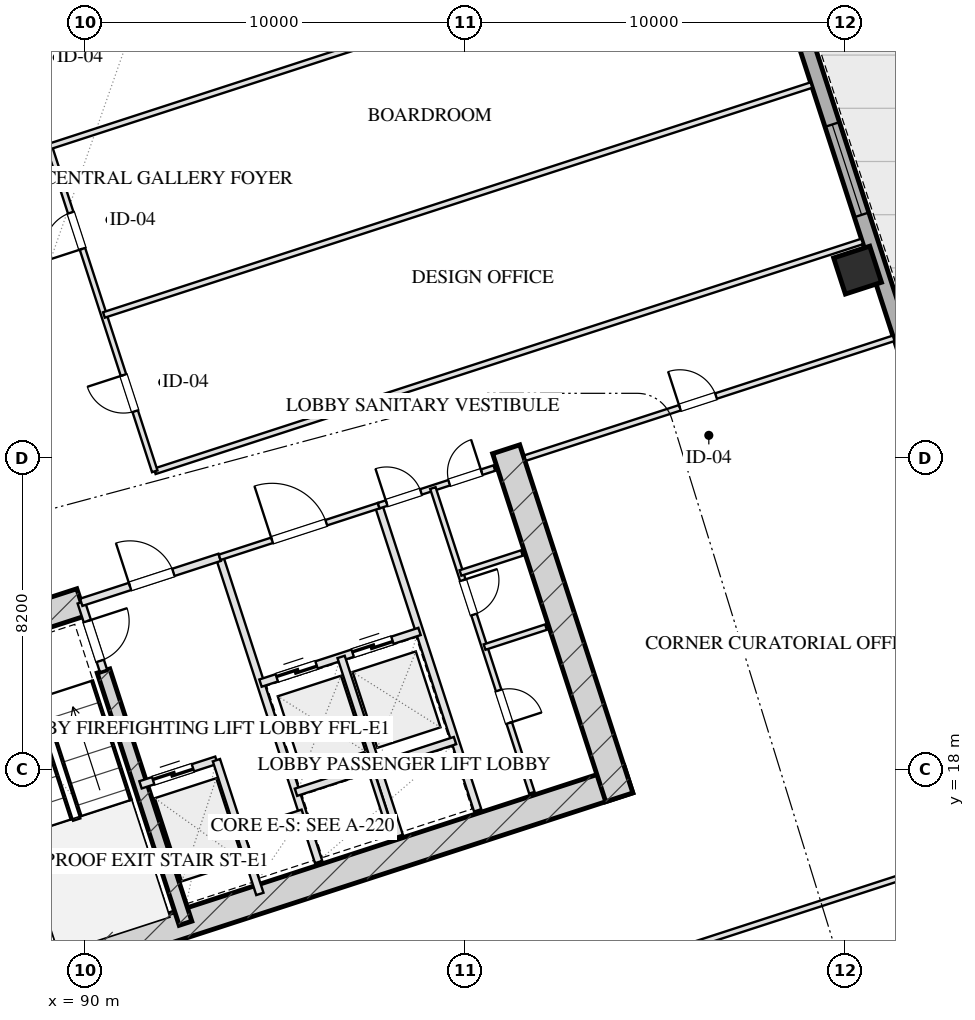
"""IFC4 building model, lengths in metres.
Left out: names, types, materials, properties, quantities, classifications, styles, units other than length and angle.
Written with IfcOpenShell. Run it as: python <this file> out.ifc"""

import sys

from ifc_helpers import new_model, si_unit, direction, frame, frame_2d, origin, origin_2d, place, context, subcontext, project, spatial, rectangle, hollow_rectangle, extrude, element, fill, save


model = new_model("IFC4")
c1 = context("Model", 3, precision=1e-05, world=origin(), true_north=direction((0.0, 1.0)))
c2 = subcontext(c1, "Body", "Model", "MODEL_VIEW")
j1 = project(units=[si_unit("LENGTHUNIT", "METRE"), si_unit("PLANEANGLEUNIT", "RADIAN")], contexts=[c1])
p1 = place(None, origin())
s1 = spatial("IfcSite", under=j1, at=p1, CompositionType="ELEMENT")
p2 = place(p1, origin())
s2 = spatial("IfcBuilding", under=s1, at=p2, CompositionType="ELEMENT")
p3 = place(p2, frame((0.0, 0.0, 26.0)))
s3 = spatial("IfcBuildingStorey", under=s2, at=p3, CompositionType="ELEMENT", Elevation=26.0)
p4 = place(p3, frame((88.559, 12.629, 0.0), z_axis=(0.0, 0.0, 1.0), x_axis=(0.951056072937, 0.309018358888, 0.0)))
e1 = element("IfcWall", 1, at=p4, inside=s3, PredefinedType="SHEAR", context=c2, shape_type="SweptSolid", body=[
    extrude(rectangle(XDim=16.55, YDim=0.75, at=frame_2d((8.275, 0.0))), origin(), (0.0, 0.0, 1.0), 4.0),
])
p5 = place(p3, frame((86.055, 21.546, 0.0), z_axis=(0.0, 0.0, 1.0), x_axis=(0.309023585745, -0.951054374604, 0.0)))
e2 = element("IfcWall", 2, at=p5, inside=s3, PredefinedType="SHEAR", context=c2, shape_type="SweptSolid", body=[
    extrude(rectangle(XDim=9.63, YDim=0.75, at=frame_2d((4.815, 0.0))), origin(), (0.0, 0.0, 1.0), 4.0),
])
p6 = place(p3, frame((101.082, 26.429, 0.0), z_axis=(0.0, 0.0, 1.0), x_axis=(0.309016134813, -0.951056795583, 0.0)))
e3 = element("IfcWall", 3, at=p6, inside=s3, PredefinedType="SHEAR", context=c2, shape_type="SweptSolid", body=[
    extrude(rectangle(XDim=9.63, YDim=0.75, at=frame_2d((4.815, 0.0))), origin(), (0.0, 0.0, 1.0), 4.0),
])
p7 = place(p3, frame((90.486, 20.594, 0.0), z_axis=(0.0, 0.0, 1.0), x_axis=(0.309020428229, -0.951055400562, 0.0)))
e4 = element("IfcWall", 4, at=p7, inside=s3, PredefinedType="SHEAR", context=c2, shape_type="SweptSolid", body=[
    extrude(rectangle(XDim=6.98, YDim=0.35, at=frame_2d((3.49, 0.0))), origin(), (0.0, 0.0, 1.0), 4.0),
])
p8 = place(p3, frame((85.814, 21.074, 0.0), z_axis=(0.0, 0.0, 1.0), x_axis=(0.95106580992, 0.308988390074, 0.0)))
e5 = element("IfcWall", 5, at=p8, inside=s3, PredefinedType="SHEAR", context=c2, shape_type="SweptSolid", body=[
    extrude(rectangle(XDim=4.295, YDim=0.75, at=frame_2d((2.147, 0.0))), origin(), (0.0, 0.0, 1.0), 4.0),
])
p9 = place(p3, frame((110.328, 31.142, 0.0), z_axis=(0.0, 0.0, 1.0), x_axis=(0.951056516295, 0.309016994375, 0.0)))
e6 = element("IfcColumn", 6, at=p9, inside=s3, PredefinedType="COLUMN", context=c2, shape_type="SweptSolid", body=[
    extrude(hollow_rectangle(XDim=1.0, YDim=1.0, WallThickness=0.036, at=origin_2d()), origin(), (0.0, 0.0, 1.0), 4.001),
])
p10 = place(p3, frame((100.345, 63.648, 0.0), z_axis=(0.0, 0.0, 1.0), x_axis=(0.309014526607, -0.951057318118, 0.0)))
e7 = element("IfcWall", 7, at=p10, inside=s3, PredefinedType="SOLIDWALL", context=c2, shape_type="SweptSolid", body=[
    extrude(rectangle(XDim=50.0, YDim=0.4, at=frame_2d((25.0, 0.0))), origin(), (0.0, 0.0, 1.0), 3.16),
])
p11 = place(p10, frame((30.15, 0.0, 0.75)))
e8 = element("IfcOpeningElement", 8, at=p11, cuts=e7, PredefinedType="OPENING", context=c2, shape_type="SweptSolid", body=[
    extrude(rectangle(XDim=2.5, YDim=1.75, at=frame_2d((1.25, 0.875))), frame((0.0, 0.21, 0.0), z_axis=(0.0, -1.0, 0.0), x_axis=(1.0, 0.0, 0.0)), (0.0, 0.0, 1.0), 0.42),
])
p12 = place(p10, frame((21.15, 0.0, 0.75)))
e9 = element("IfcOpeningElement", 9, at=p12, cuts=e7, PredefinedType="OPENING", context=c2, shape_type="SweptSolid", body=[
    extrude(rectangle(XDim=2.5, YDim=1.75, at=frame_2d((1.25, 0.875))), frame((0.0, 0.21, 0.0), z_axis=(0.0, -1.0, 0.0), x_axis=(1.0, 0.0, 0.0)), (0.0, 0.0, 1.0), 0.42),
])
p13 = place(p3, frame((89.899, 22.401, 0.0), z_axis=(0.0, 0.0, 1.0), x_axis=(0.308932062672, -0.951084108086, 0.0)))
e10 = element("IfcWall", 10, at=p13, inside=s3, PredefinedType="PARTITIONING", context=c2, shape_type="SweptSolid", body=[
    extrude(rectangle(XDim=1.9, YDim=0.2, at=frame_2d((0.95, 0.0))), origin(), (0.0, 0.0, 1.0), 3.725),
])
p14 = place(p13, frame((0.52, 0.0, 0.0)))
e11 = element("IfcOpeningElement", 11, at=p14, cuts=e10, PredefinedType="OPENING", context=c2, shape_type="SweptSolid", body=[
    extrude(rectangle(XDim=1.1, YDim=2.05, at=frame_2d((0.55, 1.025))), frame((0.0, 0.11, 0.0), z_axis=(0.0, -1.0, 0.0), x_axis=(1.0, 0.0, 0.0)), (0.0, 0.0, 1.0), 0.22),
])
p15 = place(p3, frame((93.542, 23.585, 0.0), z_axis=(0.0, 0.0, 1.0), x_axis=(0.309042196757, -0.951048327176, 0.0)))
e12 = element("IfcWall", 12, at=p15, inside=s3, PredefinedType="PARTITIONING", context=c2, shape_type="SweptSolid", body=[
    extrude(rectangle(XDim=8.43, YDim=0.2, at=frame_2d((4.215, 0.0))), origin(), (0.0, 0.0, 1.0), 3.725),
])
p16 = place(p3, frame((89.899, 22.401, 0.0), z_axis=(0.0, 0.0, 1.0), x_axis=(0.951046716504, 0.309047153403, 0.0)))
e13 = element("IfcWall", 13, at=p16, inside=s3, PredefinedType="PARTITIONING", context=c2, shape_type="SweptSolid", body=[
    extrude(rectangle(XDim=3.83, YDim=0.2, at=frame_2d((1.915, 0.0))), origin(), (0.0, 0.0, 1.0), 3.725),
])
p17 = place(p16, frame((1.35, 0.0, 0.0)))
e14 = element("IfcOpeningElement", 14, at=p17, cuts=e13, PredefinedType="OPENING", context=c2, shape_type="SweptSolid", body=[
    extrude(rectangle(XDim=1.2, YDim=2.05, at=frame_2d((0.6, 1.025))), frame((0.0, 0.11, 0.0), z_axis=(0.0, -1.0, 0.0), x_axis=(1.0, 0.0, 0.0)), (0.0, 0.0, 1.0), 0.22),
])
p18 = place(p3, frame((91.46, 17.598, 0.0), z_axis=(0.0, 0.0, 1.0), x_axis=(0.951062257173, 0.308999325213, 0.0)))
e15 = element("IfcWall", 15, at=p18, inside=s3, PredefinedType="PARTITIONING", context=c2, shape_type="SweptSolid", body=[
    extrude(rectangle(XDim=2.1, YDim=0.2, at=frame_2d((1.05, 0.0))), origin(), (0.0, 0.0, 1.0), 3.725),
])
p19 = place(p18, frame((0.35, 0.0, 0.0)))
e16 = element("IfcOpeningElement", 16, at=p19, cuts=e15, PredefinedType="OPENING", context=c2, shape_type="SweptSolid", body=[
    extrude(rectangle(XDim=1.1, YDim=2.05, at=frame_2d((0.55, 1.025))), frame((0.0, 0.11, 0.0), z_axis=(0.0, -1.0, 0.0), x_axis=(1.0, 0.0, 0.0)), (0.0, 0.0, 1.0), 0.22),
])
p20 = place(p3, frame((93.457, 18.247, 0.0), z_axis=(0.0, 0.0, 1.0), x_axis=(0.3089935693, -0.951064127245, 0.0)))
e17 = element("IfcWall", 17, at=p20, inside=s3, PredefinedType="PARTITIONING", context=c2, shape_type="SweptSolid", body=[
    extrude(rectangle(XDim=3.7, YDim=0.2, at=frame_2d((1.85, 0.0))), origin(), (0.0, 0.0, 1.0), 3.725),
])
p21 = place(p3, frame((94.084, 16.317, 0.0), z_axis=(0.0, 0.0, 1.0), x_axis=(0.951041328149, 0.309063734775, 0.0)))
e18 = element("IfcWall", 18, at=p21, inside=s3, PredefinedType="PARTITIONING", context=c2, shape_type="SweptSolid", body=[
    extrude(rectangle(XDim=1.73, YDim=0.2, at=frame_2d((0.865, 0.0))), origin(), (0.0, 0.0, 1.0), 3.725),
])
p22 = place(p3, frame((97.727, 24.944, 0.0), z_axis=(0.0, 0.0, 1.0), x_axis=(0.309016001439, -0.951056838919, 0.0)))
e19 = element("IfcWall", 19, at=p22, inside=s3, PredefinedType="PARTITIONING", context=c2, shape_type="SweptSolid", body=[
    extrude(rectangle(XDim=8.43, YDim=0.2, at=frame_2d((4.215, 0.0))), origin(), (0.0, 0.0, 1.0), 3.725),
])
p23 = place(p3, frame((93.542, 23.585, 0.0), z_axis=(0.0, 0.0, 1.0), x_axis=(0.951063829732, 0.308994485023, 0.0)))
e20 = element("IfcWall", 20, at=p23, inside=s3, PredefinedType="PARTITIONING", context=c2, shape_type="SweptSolid", body=[
    extrude(rectangle(XDim=4.4, YDim=0.15, at=frame_2d((2.2, 0.0))), origin(), (0.0, 0.0, 1.0), 3.725),
])
p24 = place(p23, frame((1.45, 0.0, 0.0)))
e21 = element("IfcOpeningElement", 21, at=p24, cuts=e20, PredefinedType="OPENING", context=c2, shape_type="SweptSolid", body=[
    extrude(rectangle(XDim=1.5, YDim=2.05, at=frame_2d((0.75, 1.025))), frame((0.0, 0.085, 0.0), z_axis=(0.0, -1.0, 0.0), x_axis=(1.0, 0.0, 0.0)), (0.0, 0.0, 1.0), 0.17),
])
p25 = place(p3, frame((94.617, 20.275, 0.0), z_axis=(0.0, 0.0, 1.0), x_axis=(0.951058531764, 0.30901079133, 0.0)))
e22 = element("IfcWall", 22, at=p25, inside=s3, PredefinedType="PARTITIONING", context=c2, shape_type="SweptSolid", body=[
    extrude(rectangle(XDim=4.4, YDim=0.2, at=frame_2d((2.2, 0.0))), origin(), (0.0, 0.0, 1.0), 3.725),
])
p26 = place(p25, frame((0.45, 0.0, 0.0)))
e23 = element("IfcOpeningElement", 23, at=p26, cuts=e22, PredefinedType="OPENING", context=c2, shape_type="SweptSolid", body=[
    extrude(rectangle(XDim=1.1, YDim=2.05, at=frame_2d((0.55, 1.025))), frame((0.0, 0.11, 0.0), z_axis=(0.0, -1.0, 0.0), x_axis=(1.0, 0.0, 0.0)), (0.0, 0.0, 1.0), 0.22),
])
p27 = place(p25, frame((2.55, 0.0, 0.0)))
e24 = element("IfcOpeningElement", 24, at=p27, cuts=e22, PredefinedType="OPENING", context=c2, shape_type="SweptSolid", body=[
    extrude(rectangle(XDim=1.1, YDim=2.05, at=frame_2d((0.55, 1.025))), frame((0.0, 0.11, 0.0), z_axis=(0.0, -1.0, 0.0), x_axis=(1.0, 0.0, 0.0)), (0.0, 0.0, 1.0), 0.22),
])
p28 = place(p3, frame((96.738, 20.964, 0.0), z_axis=(0.0, 0.0, 1.0), x_axis=(0.309042578481, -0.951048203135, 0.0)))
e25 = element("IfcWall", 25, at=p28, inside=s3, PredefinedType="PARTITIONING", context=c2, shape_type="SweptSolid", body=[
    extrude(rectangle(XDim=4.95, YDim=0.2, at=frame_2d((2.475, 0.0))), origin(), (0.0, 0.0, 1.0), 3.725),
])
p29 = place(p3, frame((95.551, 17.403, 0.0), z_axis=(0.0, 0.0, 1.0), x_axis=(0.951058531764, 0.30901079133, 0.0)))
e26 = element("IfcWall", 26, at=p29, inside=s3, PredefinedType="PARTITIONING", context=c2, shape_type="SweptSolid", body=[
    extrude(rectangle(XDim=4.4, YDim=0.2, at=frame_2d((2.2, 0.0))), origin(), (0.0, 0.0, 1.0), 3.725),
])
p30 = place(p3, frame((97.516, 17.989, 0.0), z_axis=(0.0, 0.0, 1.0), x_axis=(0.30897153969, -0.951071284217, 0.0)))
e27 = element("IfcWall", 27, at=p30, inside=s3, PredefinedType="PARTITIONING", context=c2, shape_type="SweptSolid", body=[
    extrude(rectangle(XDim=1.88, YDim=0.15, at=frame_2d((0.94, 0.0))), origin(), (0.0, 0.0, 1.0), 3.725),
])
p31 = place(p3, frame((97.727, 24.944, 0.0), z_axis=(0.0, 0.0, 1.0), x_axis=(0.951036872128, 0.309077446369, 0.0)))
e28 = element("IfcWall", 28, at=p31, inside=s3, PredefinedType="PARTITIONING", context=c2, shape_type="SweptSolid", body=[
    extrude(rectangle(XDim=3.2, YDim=0.15, at=frame_2d((1.6, 0.0))), origin(), (0.0, 0.0, 1.0), 3.725),
])
p32 = place(p31, frame((0.22, 0.0, 0.0)))
e29 = element("IfcOpeningElement", 29, at=p32, cuts=e28, PredefinedType="OPENING", context=c2, shape_type="SweptSolid", body=[
    extrude(rectangle(XDim=0.95, YDim=2.05, at=frame_2d((0.475, 1.025))), frame((0.0, 0.085, 0.0), z_axis=(0.0, -1.0, 0.0), x_axis=(1.0, 0.0, 0.0)), (0.0, 0.0, 1.0), 0.17),
])
p33 = place(p31, frame((1.95, 0.0, 0.0)))
e30 = element("IfcOpeningElement", 30, at=p33, cuts=e28, PredefinedType="OPENING", context=c2, shape_type="SweptSolid", body=[
    extrude(rectangle(XDim=0.9, YDim=2.05, at=frame_2d((0.45, 1.025))), frame((0.0, 0.085, 0.0), z_axis=(0.0, -1.0, 0.0), x_axis=(1.0, 0.0, 0.0)), (0.0, 0.0, 1.0), 0.17),
])
p34 = place(p3, frame((99.153, 25.408, 0.0), z_axis=(0.0, 0.0, 1.0), x_axis=(0.309016001439, -0.951056838919, 0.0)))
e31 = element("IfcWall", 31, at=p34, inside=s3, PredefinedType="PARTITIONING", context=c2, shape_type="SweptSolid", body=[
    extrude(rectangle(XDim=8.43, YDim=0.15, at=frame_2d((4.215, 0.0))), origin(), (0.0, 0.0, 1.0), 3.725),
])
p35 = place(p34, frame((2.55, 0.0, 0.0)))
e32 = element("IfcOpeningElement", 32, at=p35, cuts=e31, PredefinedType="OPENING", context=c2, shape_type="SweptSolid", body=[
    extrude(rectangle(XDim=0.95, YDim=2.05, at=frame_2d((0.475, 1.025))), frame((0.0, 0.085, 0.0), z_axis=(0.0, -1.0, 0.0), x_axis=(1.0, 0.0, 0.0)), (0.0, 0.0, 1.0), 0.17),
])
p36 = place(p34, frame((5.6, 0.0, 0.0)))
e33 = element("IfcOpeningElement", 33, at=p36, cuts=e31, PredefinedType="OPENING", context=c2, shape_type="SweptSolid", body=[
    extrude(rectangle(XDim=0.9, YDim=2.05, at=frame_2d((0.45, 1.025))), frame((0.0, 0.085, 0.0), z_axis=(0.0, -1.0, 0.0), x_axis=(1.0, 0.0, 0.0)), (0.0, 0.0, 1.0), 0.17),
])
for number, where, z_axis, x_axis in (
    (34, (100.513, 21.223, 0.0), (0.0, 0.0, 1.0), (0.951, 0.309, 0.0)),
    (35, (99.879, 23.173, 0.0), (0.0, 0.0, 1.0), (0.951, 0.309, 0.0)),
):
    element("IfcWall", number, at=place(p3, frame(where, z_axis=z_axis, x_axis=x_axis)), inside=s3, PredefinedType="PARTITIONING", context=c2, shape_type="SweptSolid", body=[
        extrude(rectangle(XDim=1.7, YDim=0.15, at=frame_2d((0.85, 0.0))), origin(), (0.0, 0.0, 1.0), 3.725),
    ])
p37 = place(p3, frame((105.765, 13.309, 0.0), z_axis=(0.0, 0.0, 1.0), x_axis=(0.951054294345, 0.309023832749, 0.0)))
e36 = element("IfcWall", 36, at=p37, inside=s3, PredefinedType="PARTITIONING", context=c2, shape_type="SweptSolid", body=[
    extrude(rectangle(XDim=10.2, YDim=0.15, at=frame_2d((5.1, 0.0))), origin(), (0.0, 0.0, 1.0), 3.725),
])
p38 = place(p3, frame((101.578, 26.196, 0.0), z_axis=(0.0, 0.0, 1.0), x_axis=(0.951059043131, 0.309009217467, 0.0)))
e37 = element("IfcWall", 37, at=p38, inside=s3, PredefinedType="PARTITIONING", context=c2, shape_type="SweptSolid", body=[
    extrude(rectangle(XDim=10.2, YDim=0.15, at=frame_2d((5.1, 0.0))), origin(), (0.0, 0.0, 1.0), 3.725),
])
p39 = place(p38, frame((4.284, 0.0, 0.0)))
e38 = element("IfcOpeningElement", 38, at=p39, cuts=e37, PredefinedType="OPENING", context=c2, shape_type="SweptSolid", body=[
    extrude(rectangle(XDim=1.0, YDim=2.05, at=frame_2d((0.5, 1.025))), frame((0.0, 0.085, 0.0), z_axis=(0.0, -1.0, 0.0), x_axis=(1.0, 0.0, 0.0)), (0.0, 0.0, 1.0), 0.17),
])
p40 = place(p3, frame((91.834, 25.848, 0.0), z_axis=(0.0, 0.0, 1.0), x_axis=(0.951055605195, 0.309019798438, 0.0)))
e39 = element("IfcWall", 39, at=p40, inside=s3, PredefinedType="PARTITIONING", context=c2, shape_type="SweptSolid", body=[
    extrude(rectangle(XDim=19.575, YDim=0.15, at=frame_2d((9.788, 0.0))), origin(), (0.0, 0.0, 1.0), 3.725),
])
p41 = place(p3, frame((91.834, 25.848, 0.0), z_axis=(0.0, 0.0, 1.0), x_axis=(-0.30901773025, 0.951056277195, 0.0)))
e40 = element("IfcWall", 40, at=p41, inside=s3, PredefinedType="PARTITIONING", context=c2, shape_type="SweptSolid", body=[
    extrude(rectangle(XDim=16.64, YDim=0.15, at=frame_2d((8.32, 0.0))), origin(), (0.0, 0.0, 1.0), 3.725),
])
p42 = place(p41, frame((1.663, 0.0, 0.0)))
e41 = element("IfcOpeningElement", 41, at=p42, cuts=e40, PredefinedType="OPENING", context=c2, shape_type="SweptSolid", body=[
    extrude(rectangle(XDim=1.0, YDim=2.05, at=frame_2d((0.5, 1.025))), frame((0.0, 0.085, 0.0), z_axis=(0.0, -1.0, 0.0), x_axis=(1.0, 0.0, 0.0)), (0.0, 0.0, 1.0), 0.17),
])
p43 = place(p41, frame((6.156, 0.0, 0.0)))
e42 = element("IfcOpeningElement", 42, at=p43, cuts=e40, PredefinedType="OPENING", context=c2, shape_type="SweptSolid", body=[
    extrude(rectangle(XDim=1.0, YDim=2.05, at=frame_2d((0.5, 1.025))), frame((0.0, 0.085, 0.0), z_axis=(0.0, -1.0, 0.0), x_axis=(1.0, 0.0, 0.0)), (0.0, 0.0, 1.0), 0.17),
])
p44 = place(p41, frame((10.649, 0.0, 0.0)))
e43 = element("IfcOpeningElement", 43, at=p44, cuts=e40, PredefinedType="OPENING", context=c2, shape_type="SweptSolid", body=[
    extrude(rectangle(XDim=1.0, YDim=2.05, at=frame_2d((0.5, 1.025))), frame((0.0, 0.085, 0.0), z_axis=(0.0, -1.0, 0.0), x_axis=(1.0, 0.0, 0.0)), (0.0, 0.0, 1.0), 0.17),
])
p45 = place(p41, frame((14.476, 0.0, 0.0)))
e44 = element("IfcOpeningElement", 44, at=p45, cuts=e40, PredefinedType="OPENING", context=c2, shape_type="SweptSolid", body=[
    extrude(rectangle(XDim=1.0, YDim=2.05, at=frame_2d((0.5, 1.025))), frame((0.0, 0.085, 0.0), z_axis=(0.0, -1.0, 0.0), x_axis=(1.0, 0.0, 0.0)), (0.0, 0.0, 1.0), 0.17),
])
for number, where, z_axis, x_axis in (
    (45, (90.497, 29.962, 0.0), (0.0, 0.0, 1.0), (0.951, 0.309, 0.0)),
    (46, (89.057, 34.394, 0.0), (0.0, 0.0, 1.0), (0.951, 0.309, 0.0)),
):
    element("IfcWall", number, at=place(p3, frame(where, z_axis=z_axis, x_axis=x_axis)), inside=s3, PredefinedType="PARTITIONING", context=c2, shape_type="SweptSolid", body=[
        extrude(rectangle(XDim=19.575, YDim=0.15, at=frame_2d((9.788, 0.0))), origin(), (0.0, 0.0, 1.0), 3.725),
    ])
p46 = place(p11, origin())
e47 = element("IfcWindow", 47, at=p46, inside=s3, PartitioningType="TRIPLE_PANEL_VERTICAL", PredefinedType="WINDOW", context=c2, shape_type="SweptSolid", body=[
    extrude(rectangle(XDim=2.5, YDim=1.75, at=frame_2d((1.25, 0.875))), frame((0.0, 0.03, 0.0), z_axis=(0.0, -1.0, 0.0), x_axis=(1.0, 0.0, 0.0)), (0.0, 0.0, 1.0), 0.06),
])
fill(e8, e47)
p47 = place(p14, origin())
e48 = element("IfcDoor", 48, at=p47, inside=s3, OperationType="SINGLE_SWING_LEFT", PredefinedType="DOOR", context=c2, shape_type="SweptSolid", body=[
    extrude(rectangle(XDim=1.1, YDim=2.05, at=frame_2d((0.55, 1.025))), frame((0.0, 0.025, 0.0), z_axis=(0.0, -1.0, 0.0), x_axis=(1.0, 0.0, 0.0)), (0.0, 0.0, 1.0), 0.05),
])
fill(e11, e48)
p48 = place(p17, origin())
e49 = element("IfcDoor", 49, at=p48, inside=s3, OperationType="SINGLE_SWING_LEFT", PredefinedType="DOOR", context=c2, shape_type="SweptSolid", body=[
    extrude(rectangle(XDim=1.2, YDim=2.05, at=frame_2d((0.6, 1.025))), frame((0.0, 0.025, 0.0), z_axis=(0.0, -1.0, 0.0), x_axis=(1.0, 0.0, 0.0)), (0.0, 0.0, 1.0), 0.05),
])
fill(e14, e49)
p49 = place(p19, origin())
e50 = element("IfcDoor", 50, at=p49, inside=s3, OperationType="DOUBLE_DOOR_SLIDING", PredefinedType="DOOR", context=c2, shape_type="SweptSolid", body=[
    extrude(rectangle(XDim=1.1, YDim=2.05, at=frame_2d((0.55, 1.025))), frame((0.0, 0.025, 0.0), z_axis=(0.0, -1.0, 0.0), x_axis=(1.0, 0.0, 0.0)), (0.0, 0.0, 1.0), 0.05),
])
fill(e16, e50)
p50 = place(p24, origin())
e51 = element("IfcDoor", 51, at=p50, inside=s3, OperationType="SINGLE_SWING_LEFT", PredefinedType="DOOR", context=c2, shape_type="SweptSolid", body=[
    extrude(rectangle(XDim=1.5, YDim=2.05, at=frame_2d((0.75, 1.025))), frame((0.0, 0.025, 0.0), z_axis=(0.0, -1.0, 0.0), x_axis=(1.0, 0.0, 0.0)), (0.0, 0.0, 1.0), 0.05),
])
fill(e21, e51)
p51 = place(p26, origin())
e52 = element("IfcDoor", 52, at=p51, inside=s3, OperationType="DOUBLE_DOOR_SLIDING", PredefinedType="DOOR", context=c2, shape_type="SweptSolid", body=[
    extrude(rectangle(XDim=1.1, YDim=2.05, at=frame_2d((0.55, 1.025))), frame((0.0, 0.025, 0.0), z_axis=(0.0, -1.0, 0.0), x_axis=(1.0, 0.0, 0.0)), (0.0, 0.0, 1.0), 0.05),
])
fill(e23, e52)
p52 = place(p27, origin())
e53 = element("IfcDoor", 53, at=p52, inside=s3, OperationType="DOUBLE_DOOR_SLIDING", PredefinedType="DOOR", context=c2, shape_type="SweptSolid", body=[
    extrude(rectangle(XDim=1.1, YDim=2.05, at=frame_2d((0.55, 1.025))), frame((0.0, 0.025, 0.0), z_axis=(0.0, -1.0, 0.0), x_axis=(1.0, 0.0, 0.0)), (0.0, 0.0, 1.0), 0.05),
])
fill(e24, e53)
p53 = place(p32, origin())
e54 = element("IfcDoor", 54, at=p53, inside=s3, OperationType="SINGLE_SWING_LEFT", PredefinedType="DOOR", context=c2, shape_type="SweptSolid", body=[
    extrude(rectangle(XDim=0.95, YDim=2.05, at=frame_2d((0.475, 1.025))), frame((0.0, 0.025, 0.0), z_axis=(0.0, -1.0, 0.0), x_axis=(1.0, 0.0, 0.0)), (0.0, 0.0, 1.0), 0.05),
])
fill(e29, e54)
p54 = place(p33, origin())
e55 = element("IfcDoor", 55, at=p54, inside=s3, OperationType="SINGLE_SWING_RIGHT", PredefinedType="DOOR", context=c2, shape_type="SweptSolid", body=[
    extrude(rectangle(XDim=0.9, YDim=2.05, at=frame_2d((0.45, 1.025))), frame((0.0, 0.025, 0.0), z_axis=(0.0, -1.0, 0.0), x_axis=(1.0, 0.0, 0.0)), (0.0, 0.0, 1.0), 0.05),
])
fill(e30, e55)
p55 = place(p35, origin())
e56 = element("IfcDoor", 56, at=p55, inside=s3, OperationType="SINGLE_SWING_LEFT", PredefinedType="DOOR", context=c2, shape_type="SweptSolid", body=[
    extrude(rectangle(XDim=0.95, YDim=2.05, at=frame_2d((0.475, 1.025))), frame((0.0, 0.025, 0.0), z_axis=(0.0, -1.0, 0.0), x_axis=(1.0, 0.0, 0.0)), (0.0, 0.0, 1.0), 0.05),
])
fill(e32, e56)
p56 = place(p36, origin())
e57 = element("IfcDoor", 57, at=p56, inside=s3, OperationType="SINGLE_SWING_RIGHT", PredefinedType="DOOR", context=c2, shape_type="SweptSolid", body=[
    extrude(rectangle(XDim=0.9, YDim=2.05, at=frame_2d((0.45, 1.025))), frame((0.0, 0.025, 0.0), z_axis=(0.0, -1.0, 0.0), x_axis=(1.0, 0.0, 0.0)), (0.0, 0.0, 1.0), 0.05),
])
fill(e33, e57)
p57 = place(p39, origin())
e58 = element("IfcDoor", 58, at=p57, inside=s3, OperationType="SINGLE_SWING_LEFT", PredefinedType="DOOR", context=c2, shape_type="SweptSolid", body=[
    extrude(rectangle(XDim=1.0, YDim=2.05, at=frame_2d((0.5, 1.025))), frame((0.0, 0.025, 0.0), z_axis=(0.0, -1.0, 0.0), x_axis=(1.0, 0.0, 0.0)), (0.0, 0.0, 1.0), 0.05),
])
fill(e38, e58)
p58 = place(p42, origin())
e59 = element("IfcDoor", 59, at=p58, inside=s3, OperationType="SINGLE_SWING_RIGHT", PredefinedType="DOOR", context=c2, shape_type="SweptSolid", body=[
    extrude(rectangle(XDim=1.0, YDim=2.05, at=frame_2d((0.5, 1.025))), frame((0.0, 0.025, 0.0), z_axis=(0.0, -1.0, 0.0), x_axis=(1.0, 0.0, 0.0)), (0.0, 0.0, 1.0), 0.05),
])
fill(e41, e59)
p59 = place(p43, origin())
e60 = element("IfcDoor", 60, at=p59, inside=s3, OperationType="SINGLE_SWING_LEFT", PredefinedType="DOOR", context=c2, shape_type="SweptSolid", body=[
    extrude(rectangle(XDim=1.0, YDim=2.05, at=frame_2d((0.5, 1.025))), frame((0.0, 0.025, 0.0), z_axis=(0.0, -1.0, 0.0), x_axis=(1.0, 0.0, 0.0)), (0.0, 0.0, 1.0), 0.05),
])
fill(e42, e60)
save(model, sys.argv[1])
